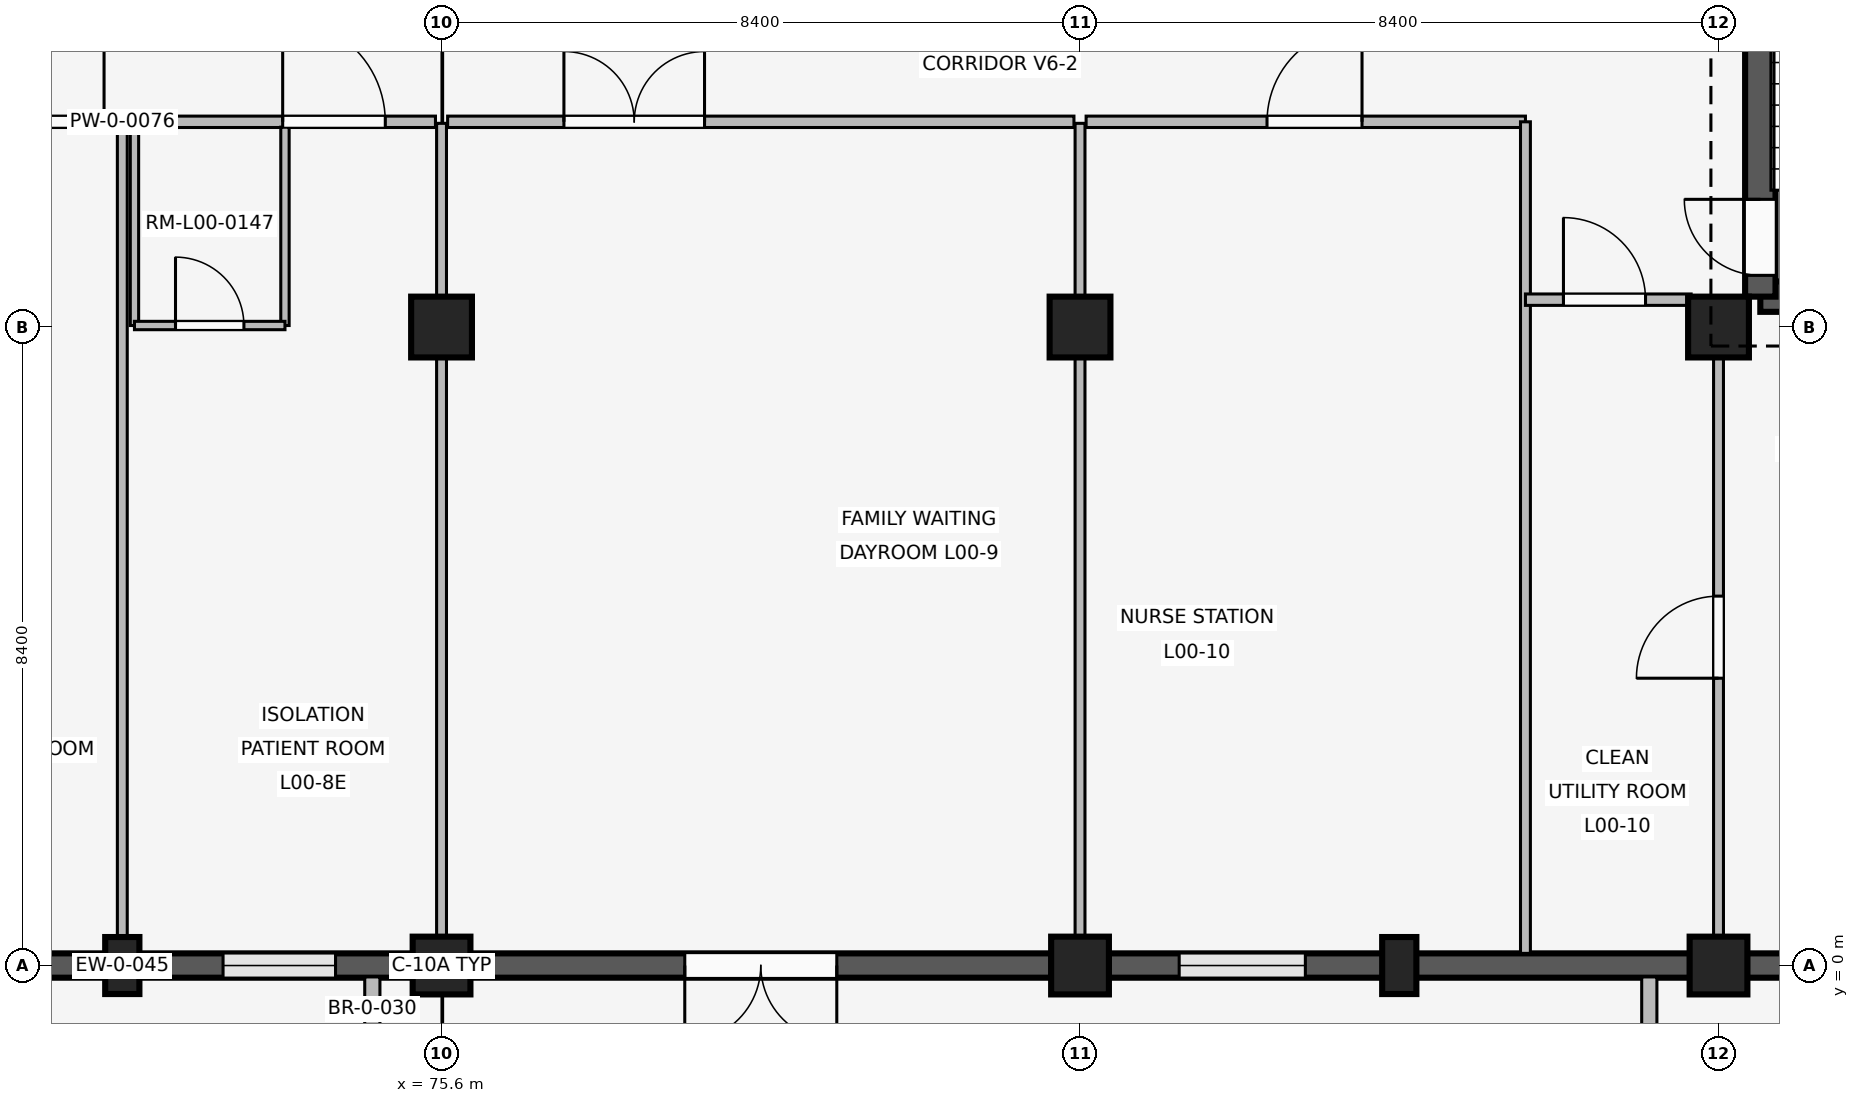
"""IFC4 building model, lengths in metres.
Left out: names, types, materials, properties, quantities, classifications, styles, units other than length and angle.
Written with IfcOpenShell. Run it as: python <this file> out.ifc"""

import sys

from ifc_helpers import new_model, si_unit, direction, frame, frame_2d, origin, origin_2d, place, context, subcontext, project, spatial, rectangle, extrude, element, fill, save


model = new_model("IFC4")
c1 = context("Model", 3, precision=1e-05, world=origin(), true_north=direction((0.0, 1.0)))
c2 = subcontext(c1, "Body", "Model", "MODEL_VIEW")
j1 = project(units=[si_unit("LENGTHUNIT", "METRE"), si_unit("PLANEANGLEUNIT", "RADIAN")], contexts=[c1])
p1 = place(None, origin())
s1 = spatial("IfcSite", under=j1, at=p1, CompositionType="ELEMENT")
p2 = place(p1, origin())
s2 = spatial("IfcBuilding", under=s1, at=p2, CompositionType="ELEMENT")
p3 = place(p2, origin())
s3 = spatial("IfcBuildingStorey", under=s2, at=p3, CompositionType="ELEMENT", Elevation=0.0)
p4 = place(p3, frame((75.6, 0.0, 0.0), z_axis=(0.0, 0.0, 1.0), x_axis=(1.0, 0.0, 0.0)))
e1 = element("IfcColumn", 1, at=p4, inside=s3, PredefinedType="COLUMN", context=c2, shape_type="SweptSolid", body=[
    extrude(rectangle(XDim=0.76, YDim=0.76, at=origin_2d()), origin(), (0.0, 0.0, 1.0), 4.8),
])
p5 = place(p3, frame((75.6, 8.4, 0.0), z_axis=(0.0, 0.0, 1.0), x_axis=(1.0, 0.0, 0.0)))
e2 = element("IfcColumn", 2, at=p5, inside=s3, PredefinedType="COLUMN", context=c2, shape_type="SweptSolid", body=[
    extrude(rectangle(XDim=0.8, YDim=0.8, at=origin_2d()), origin(), (0.0, 0.0, 1.0), 4.8),
])
p6 = place(p3, frame((84.0, 0.0, 0.0), z_axis=(0.0, 0.0, 1.0), x_axis=(1.0, 0.0, 0.0)))
e3 = element("IfcColumn", 3, at=p6, inside=s3, PredefinedType="COLUMN", context=c2, shape_type="SweptSolid", body=[
    extrude(rectangle(XDim=0.76, YDim=0.76, at=origin_2d()), origin(), (0.0, 0.0, 1.0), 4.8),
])
p7 = place(p3, frame((84.0, 8.4, 0.0), z_axis=(0.0, 0.0, 1.0), x_axis=(1.0, 0.0, 0.0)))
e4 = element("IfcColumn", 4, at=p7, inside=s3, PredefinedType="COLUMN", context=c2, shape_type="SweptSolid", body=[
    extrude(rectangle(XDim=0.8, YDim=0.8, at=origin_2d()), origin(), (0.0, 0.0, 1.0), 4.8),
])
p8 = place(p3, frame((92.4, 0.0, 0.0), z_axis=(0.0, 0.0, 1.0), x_axis=(1.0, 0.0, 0.0)))
e5 = element("IfcColumn", 5, at=p8, inside=s3, PredefinedType="COLUMN", context=c2, shape_type="SweptSolid", body=[
    extrude(rectangle(XDim=0.76, YDim=0.76, at=origin_2d()), origin(), (0.0, 0.0, 1.0), 4.8),
])
p9 = place(p3, frame((92.4, 8.4, 0.0), z_axis=(0.0, 0.0, 1.0), x_axis=(1.0, 0.0, 0.0)))
e6 = element("IfcColumn", 6, at=p9, inside=s3, PredefinedType="COLUMN", context=c2, shape_type="SweptSolid", body=[
    extrude(rectangle(XDim=0.8, YDim=0.8, at=origin_2d()), origin(), (0.0, 0.0, 1.0), 4.8),
])
for number, where, z_axis, x_axis in (
    (7, (71.4, 0.0, 0.0), (0.0, 0.0, 1.0), (1.0, 0.0, 0.0)),
    (8, (88.2, 0.0, 0.0), (0.0, 0.0, 1.0), (1.0, 0.0, 0.0)),
):
    element("IfcColumn", number, at=place(p3, frame(where, z_axis=z_axis, x_axis=x_axis)), inside=s3, PredefinedType="PILASTER", context=c2, shape_type="SweptSolid", body=[
        extrude(rectangle(XDim=0.45, YDim=0.75, at=origin_2d()), origin(), (0.0, 0.0, 1.0), 4.8),
    ])
p10 = place(p3, frame((75.225, 0.0, 0.0), z_axis=(0.0, 0.0, 1.0), x_axis=(-1.0, 0.0, 0.0)))
e9 = element("IfcWall", 9, at=p10, inside=s3, PredefinedType="SOLIDWALL", context=c2, shape_type="SweptSolid", body=[
    extrude(rectangle(XDim=7.65, YDim=0.32, at=frame_2d((3.825, 0.0))), origin(), (0.0, 0.0, 1.0), 3.82),
])
p11 = place(p10, frame((1.02, 0.0, 0.85)))
e10 = element("IfcOpeningElement", 10, at=p11, cuts=e9, PredefinedType="OPENING", context=c2, shape_type="SweptSolid", body=[
    extrude(rectangle(XDim=1.48, YDim=1.6, at=frame_2d((0.74, 0.8))), frame((0.0, 0.17, 0.0), z_axis=(0.0, -1.0, 0.0), x_axis=(1.0, 0.0, 0.0)), (0.0, 0.0, 1.0), 0.34),
])
p12 = place(p10, frame((5.15, 0.0, 0.85)))
e11 = element("IfcOpeningElement", 11, at=p12, cuts=e9, PredefinedType="OPENING", context=c2, shape_type="SweptSolid", body=[
    extrude(rectangle(XDim=1.48, YDim=1.6, at=frame_2d((0.74, 0.8))), frame((0.0, 0.17, 0.0), z_axis=(0.0, -1.0, 0.0), x_axis=(1.0, 0.0, 0.0)), (0.0, 0.0, 1.0), 0.34),
])
p13 = place(p3, frame((74.689, -0.15, 0.0), z_axis=(0.0, 0.0, 1.0), x_axis=(0.0, -1.0, 0.0)))
e12 = element("IfcWall", 12, at=p13, inside=s3, PredefinedType="ELEMENTEDWALL", context=c2, shape_type="SweptSolid", body=[
    extrude(rectangle(XDim=0.85, YDim=0.2, at=frame_2d((0.425, 0.0))), origin(), (0.0, 0.0, 1.0), 3.8),
])
p14 = place(p3, frame((83.625, 0.0, 0.0), z_axis=(0.0, 0.0, 1.0), x_axis=(-1.0, 0.0, 0.0)))
e13 = element("IfcWall", 13, at=p14, inside=s3, PredefinedType="SOLIDWALL", context=c2, shape_type="SweptSolid", body=[
    extrude(rectangle(XDim=7.65, YDim=0.32, at=frame_2d((3.825, 0.0))), origin(), (0.0, 0.0, 1.0), 3.82),
])
p15 = place(p14, frame((2.825, 0.0, 0.0)))
e14 = element("IfcOpeningElement", 14, at=p15, cuts=e13, PredefinedType="OPENING", context=c2, shape_type="SweptSolid", body=[
    extrude(rectangle(XDim=2.0, YDim=2.4, at=frame_2d((1.0, 1.2))), frame((0.0, 0.17, 0.0), z_axis=(0.0, -1.0, 0.0), x_axis=(1.0, 0.0, 0.0)), (0.0, 0.0, 1.0), 0.34),
])
p16 = place(p3, frame((92.025, 0.0, 0.0), z_axis=(0.0, 0.0, 1.0), x_axis=(-1.0, 0.0, 0.0)))
e15 = element("IfcWall", 15, at=p16, inside=s3, PredefinedType="SOLIDWALL", context=c2, shape_type="SweptSolid", body=[
    extrude(rectangle(XDim=7.65, YDim=0.32, at=frame_2d((3.825, 0.0))), origin(), (0.0, 0.0, 1.0), 3.82),
])
p17 = place(p16, frame((5.061, 0.0, 0.85)))
e16 = element("IfcOpeningElement", 16, at=p17, cuts=e15, PredefinedType="OPENING", context=c2, shape_type="SweptSolid", body=[
    extrude(rectangle(XDim=1.66, YDim=1.95, at=frame_2d((0.83, 0.975))), frame((0.0, 0.17, 0.0), z_axis=(0.0, -1.0, 0.0), x_axis=(1.0, 0.0, 0.0)), (0.0, 0.0, 1.0), 0.34),
])
p18 = place(p3, frame((91.49, -0.15, 0.0), z_axis=(0.0, 0.0, 1.0), x_axis=(0.0, -1.0, 0.0)))
e17 = element("IfcWall", 17, at=p18, inside=s3, PredefinedType="ELEMENTEDWALL", context=c2, shape_type="SweptSolid", body=[
    extrude(rectangle(XDim=0.85, YDim=0.2, at=frame_2d((0.425, 0.0))), origin(), (0.0, 0.0, 1.0), 3.8),
])
p19 = place(p3, frame((100.425, 0.0, 0.0), z_axis=(0.0, 0.0, 1.0), x_axis=(-1.0, 0.0, 0.0)))
e18 = element("IfcWall", 18, at=p19, inside=s3, PredefinedType="SOLIDWALL", context=c2, shape_type="SweptSolid", body=[
    extrude(rectangle(XDim=7.65, YDim=0.32, at=frame_2d((3.825, 0.0))), origin(), (0.0, 0.0, 1.0), 3.82),
])
p20 = place(p19, frame((5.375, 0.0, 0.0)))
e19 = element("IfcOpeningElement", 19, at=p20, cuts=e18, PredefinedType="OPENING", context=c2, shape_type="SweptSolid", body=[
    extrude(rectangle(XDim=1.2, YDim=2.25, at=frame_2d((0.6, 1.125))), frame((0.0, 0.17, 0.0), z_axis=(0.0, -1.0, 0.0), x_axis=(1.0, 0.0, 0.0)), (0.0, 0.0, 1.0), 0.34),
])
p21 = place(p19, frame((0.8, 0.0, 0.85)))
e20 = element("IfcOpeningElement", 20, at=p21, cuts=e18, PredefinedType="OPENING", context=c2, shape_type="SweptSolid", body=[
    extrude(rectangle(XDim=1.54, YDim=1.85, at=frame_2d((0.77, 0.925))), frame((0.0, 0.17, 0.0), z_axis=(0.0, -1.0, 0.0), x_axis=(1.0, 0.0, 0.0)), (0.0, 0.0, 1.0), 0.34),
])
p22 = place(p19, frame((2.9, 0.0, 0.85)))
e21 = element("IfcOpeningElement", 21, at=p22, cuts=e18, PredefinedType="OPENING", context=c2, shape_type="SweptSolid", body=[
    extrude(rectangle(XDim=1.54, YDim=1.85, at=frame_2d((0.77, 0.925))), frame((0.0, 0.17, 0.0), z_axis=(0.0, -1.0, 0.0), x_axis=(1.0, 0.0, 0.0)), (0.0, 0.0, 1.0), 0.34),
])
p23 = place(p3, frame((92.95, 8.8, 0.0), z_axis=(0.0, 0.0, 1.0), x_axis=(1.0, 0.0, 0.0)))
e22 = element("IfcWall", 22, at=p23, inside=s3, PredefinedType="SHEAR", context=c2, shape_type="SweptSolid", body=[
    extrude(rectangle(XDim=7.5, YDim=0.4, at=frame_2d((3.75, 0.0))), origin(), (0.0, 0.0, 1.0), 4.52),
])
p24 = place(p23, frame((4.85, 0.0, 0.0)))
e23 = element("IfcOpeningElement", 23, at=p24, cuts=e22, PredefinedType="OPENING", context=c2, shape_type="SweptSolid", body=[
    extrude(rectangle(XDim=1.2, YDim=2.2, at=frame_2d((0.6, 1.1))), frame((0.0, 0.21, 0.0), z_axis=(0.0, -1.0, 0.0), x_axis=(1.0, 0.0, 0.0)), (0.0, 0.0, 1.0), 0.42),
])
p25 = place(p23, frame((0.9, 0.0, 0.0)))
e24 = element("IfcOpeningElement", 24, at=p25, cuts=e22, PredefinedType="OPENING", context=c2, shape_type="SweptSolid", body=[
    extrude(rectangle(XDim=1.2, YDim=2.2, at=frame_2d((0.6, 1.1))), frame((0.0, 0.21, 0.0), z_axis=(0.0, -1.0, 0.0), x_axis=(1.0, 0.0, 0.0)), (0.0, 0.0, 1.0), 0.42),
])
p26 = place(p3, frame((92.95, 8.8, 0.0), z_axis=(0.0, 0.0, 1.0), x_axis=(0.0, 1.0, 0.0)))
e25 = element("IfcWall", 25, at=p26, inside=s3, PredefinedType="SHEAR", context=c2, shape_type="SweptSolid", body=[
    extrude(rectangle(XDim=7.55, YDim=0.4, at=frame_2d((3.775, 0.0))), origin(), (0.0, 0.0, 1.0), 4.52),
])
p27 = place(p26, frame((0.28, 0.0, 0.0)))
e26 = element("IfcOpeningElement", 26, at=p27, cuts=e25, PredefinedType="OPENING", context=c2, shape_type="SweptSolid", body=[
    extrude(rectangle(XDim=1.0, YDim=2.15, at=frame_2d((0.5, 1.075))), frame((0.0, 0.21, 0.0), z_axis=(0.0, -1.0, 0.0), x_axis=(1.0, 0.0, 0.0)), (0.0, 0.0, 1.0), 0.42),
])
p28 = place(p3, frame((67.28, 11.1, 0.0), z_axis=(0.0, 0.0, 1.0), x_axis=(1.0, 0.0, 0.0)))
e27 = element("IfcWall", 27, at=p28, inside=s3, PredefinedType="PARTITIONING", context=c2, shape_type="SweptSolid", body=[
    extrude(rectangle(XDim=8.24, YDim=0.15, at=frame_2d((4.12, 0.0))), origin(), (0.0, 0.0, 1.0), 3.8),
])
p29 = place(p28, frame((2.53, 0.0, 0.0)))
e28 = element("IfcOpeningElement", 28, at=p29, cuts=e27, PredefinedType="OPENING", context=c2, shape_type="SweptSolid", body=[
    extrude(rectangle(XDim=1.35, YDim=2.25, at=frame_2d((0.675, 1.125))), frame((0.0, 0.085, 0.0), z_axis=(0.0, -1.0, 0.0), x_axis=(1.0, 0.0, 0.0)), (0.0, 0.0, 1.0), 0.17),
])
p30 = place(p28, frame((6.23, 0.0, 0.0)))
e29 = element("IfcOpeningElement", 29, at=p30, cuts=e27, PredefinedType="OPENING", context=c2, shape_type="SweptSolid", body=[
    extrude(rectangle(XDim=1.35, YDim=2.25, at=frame_2d((0.675, 1.125))), frame((0.0, 0.085, 0.0), z_axis=(0.0, -1.0, 0.0), x_axis=(1.0, 0.0, 0.0)), (0.0, 0.0, 1.0), 0.17),
])
p31 = place(p3, frame((71.4, 0.1, 0.0), z_axis=(0.0, 0.0, 1.0), x_axis=(0.0, 1.0, 0.0)))
e30 = element("IfcWall", 30, at=p31, inside=s3, PredefinedType="PARTITIONING", context=c2, shape_type="SweptSolid", body=[
    extrude(rectangle(XDim=10.93, YDim=0.13, at=frame_2d((5.465, 0.0))), origin(), (0.0, 0.0, 1.0), 3.8),
])
for number, where, z_axis, x_axis in (
    (31, (71.56, 8.42, 0.0), (0.0, 0.0, 1.0), (0.0, 1.0, 0.0)),
    (32, (73.54, 8.42, 0.0), (0.0, 0.0, 1.0), (0.0, 1.0, 0.0)),
):
    element("IfcWall", number, at=place(p3, frame(where, z_axis=z_axis, x_axis=x_axis)), inside=s3, PredefinedType="PARTITIONING", context=c2, shape_type="SweptSolid", body=[
        extrude(rectangle(XDim=2.61, YDim=0.11, at=frame_2d((1.305, 0.0))), origin(), (0.0, 0.0, 1.0), 3.8),
    ])
p32 = place(p3, frame((71.56, 8.42, 0.0), z_axis=(0.0, 0.0, 1.0), x_axis=(1.0, 0.0, 0.0)))
e33 = element("IfcWall", 33, at=p32, inside=s3, PredefinedType="PARTITIONING", context=c2, shape_type="SweptSolid", body=[
    extrude(rectangle(XDim=1.98, YDim=0.11, at=frame_2d((0.99, 0.0))), origin(), (0.0, 0.0, 1.0), 3.8),
])
p33 = place(p32, frame((0.54, 0.0, 0.0)))
e34 = element("IfcOpeningElement", 34, at=p33, cuts=e33, PredefinedType="OPENING", context=c2, shape_type="SweptSolid", body=[
    extrude(rectangle(XDim=0.9, YDim=2.1, at=frame_2d((0.45, 1.05))), frame((0.0, 0.065, 0.0), z_axis=(0.0, -1.0, 0.0), x_axis=(1.0, 0.0, 0.0)), (0.0, 0.0, 1.0), 0.13),
])
p34 = place(p3, frame((75.6, 0.14, 0.0), z_axis=(0.0, 0.0, 1.0), x_axis=(0.0, 1.0, 0.0)))
e35 = element("IfcWall", 35, at=p34, inside=s3, PredefinedType="PARTITIONING", context=c2, shape_type="SweptSolid", body=[
    extrude(rectangle(XDim=10.94, YDim=0.13, at=frame_2d((5.47, 0.0))), origin(), (0.0, 0.0, 1.0), 3.8),
])
p35 = place(p3, frame((75.68, 11.1, 0.0), z_axis=(0.0, 0.0, 1.0), x_axis=(1.0, 0.0, 0.0)))
e36 = element("IfcWall", 36, at=p35, inside=s3, PredefinedType="PARTITIONING", context=c2, shape_type="SweptSolid", body=[
    extrude(rectangle(XDim=8.24, YDim=0.15, at=frame_2d((4.12, 0.0))), origin(), (0.0, 0.0, 1.0), 3.8),
])
p36 = place(p35, frame((1.53, 0.0, 0.0)))
e37 = element("IfcOpeningElement", 37, at=p36, cuts=e36, PredefinedType="OPENING", context=c2, shape_type="SweptSolid", body=[
    extrude(rectangle(XDim=1.85, YDim=2.3, at=frame_2d((0.925, 1.15))), frame((0.0, 0.085, 0.0), z_axis=(0.0, -1.0, 0.0), x_axis=(1.0, 0.0, 0.0)), (0.0, 0.0, 1.0), 0.17),
])
p37 = place(p3, frame((84.0, 0.14, 0.0), z_axis=(0.0, 0.0, 1.0), x_axis=(0.0, 1.0, 0.0)))
e38 = element("IfcWall", 38, at=p37, inside=s3, PredefinedType="PARTITIONING", context=c2, shape_type="SweptSolid", body=[
    extrude(rectangle(XDim=10.94, YDim=0.13, at=frame_2d((5.47, 0.0))), origin(), (0.0, 0.0, 1.0), 3.8),
])
p38 = place(p3, frame((84.08, 11.1, 0.0), z_axis=(0.0, 0.0, 1.0), x_axis=(1.0, 0.0, 0.0)))
e39 = element("IfcWall", 39, at=p38, inside=s3, PredefinedType="PARTITIONING", context=c2, shape_type="SweptSolid", body=[
    extrude(rectangle(XDim=5.78, YDim=0.15, at=frame_2d((2.89, 0.0))), origin(), (0.0, 0.0, 1.0), 3.8),
])
p39 = place(p38, frame((2.38, 0.0, 0.0)))
e40 = element("IfcOpeningElement", 40, at=p39, cuts=e39, PredefinedType="OPENING", context=c2, shape_type="SweptSolid", body=[
    extrude(rectangle(XDim=1.25, YDim=2.2, at=frame_2d((0.625, 1.1))), frame((0.0, 0.085, 0.0), z_axis=(0.0, -1.0, 0.0), x_axis=(1.0, 0.0, 0.0)), (0.0, 0.0, 1.0), 0.17),
])
p40 = place(p3, frame((89.86, 0.16, 0.0), z_axis=(0.0, 0.0, 1.0), x_axis=(0.0, 1.0, 0.0)))
e41 = element("IfcWall", 41, at=p40, inside=s3, PredefinedType="PARTITIONING", context=c2, shape_type="SweptSolid", body=[
    extrude(rectangle(XDim=10.94, YDim=0.13, at=frame_2d((5.47, 0.0))), origin(), (0.0, 0.0, 1.0), 3.8),
])
p41 = place(p3, frame((89.86, 8.76, 0.0), z_axis=(0.0, 0.0, 1.0), x_axis=(1.0, 0.0, 0.0)))
e42 = element("IfcWall", 42, at=p41, inside=s3, PredefinedType="PARTITIONING", context=c2, shape_type="SweptSolid", body=[
    extrude(rectangle(XDim=2.18, YDim=0.15, at=frame_2d((1.09, 0.0))), origin(), (0.0, 0.0, 1.0), 3.8),
])
p42 = place(p41, frame((0.5, 0.0, 0.0)))
e43 = element("IfcOpeningElement", 43, at=p42, cuts=e42, PredefinedType="OPENING", context=c2, shape_type="SweptSolid", body=[
    extrude(rectangle(XDim=1.08, YDim=2.15, at=frame_2d((0.54, 1.075))), frame((0.0, 0.085, 0.0), z_axis=(0.0, -1.0, 0.0), x_axis=(1.0, 0.0, 0.0)), (0.0, 0.0, 1.0), 0.17),
])
p43 = place(p3, frame((92.4, 0.14, 0.0), z_axis=(0.0, 0.0, 1.0), x_axis=(0.0, 1.0, 0.0)))
e44 = element("IfcWall", 44, at=p43, inside=s3, PredefinedType="PARTITIONING", context=c2, shape_type="SweptSolid", body=[
    extrude(rectangle(XDim=8.21, YDim=0.13, at=frame_2d((4.105, 0.0))), origin(), (0.0, 0.0, 1.0), 3.8),
])
p44 = place(p43, frame((3.64, 0.0, 0.0)))
e45 = element("IfcOpeningElement", 45, at=p44, cuts=e44, PredefinedType="OPENING", context=c2, shape_type="SweptSolid", body=[
    extrude(rectangle(XDim=1.08, YDim=2.15, at=frame_2d((0.54, 1.075))), frame((0.0, 0.075, 0.0), z_axis=(0.0, -1.0, 0.0), x_axis=(1.0, 0.0, 0.0)), (0.0, 0.0, 1.0), 0.15),
])
p45 = place(p11, origin())
e46 = element("IfcWindow", 46, at=p45, inside=s3, PartitioningType="SINGLE_PANEL", PredefinedType="WINDOW", context=c2, shape_type="SweptSolid", body=[
    extrude(rectangle(XDim=1.48, YDim=1.6, at=frame_2d((0.74, 0.8))), frame((0.0, 0.03, 0.0), z_axis=(0.0, -1.0, 0.0), x_axis=(1.0, 0.0, 0.0)), (0.0, 0.0, 1.0), 0.06),
])
fill(e10, e46)
p46 = place(p15, origin())
e47 = element("IfcDoor", 47, at=p46, inside=s3, OperationType="DOUBLE_SWING_LEFT", PredefinedType="DOOR", context=c2, shape_type="SweptSolid", body=[
    extrude(rectangle(XDim=2.0, YDim=2.4, at=frame_2d((1.0, 1.2))), frame((0.0, 0.025, 0.0), z_axis=(0.0, -1.0, 0.0), x_axis=(1.0, 0.0, 0.0)), (0.0, 0.0, 1.0), 0.05),
])
fill(e14, e47)
p47 = place(p17, origin())
e48 = element("IfcWindow", 48, at=p47, inside=s3, PartitioningType="SINGLE_PANEL", PredefinedType="WINDOW", context=c2, shape_type="SweptSolid", body=[
    extrude(rectangle(XDim=1.66, YDim=1.95, at=frame_2d((0.83, 0.975))), frame((0.0, 0.03, 0.0), z_axis=(0.0, -1.0, 0.0), x_axis=(1.0, 0.0, 0.0)), (0.0, 0.0, 1.0), 0.06),
])
fill(e16, e48)
p48 = place(p27, origin())
e49 = element("IfcDoor", 49, at=p48, inside=s3, OperationType="SINGLE_SWING_RIGHT", PredefinedType="DOOR", context=c2, shape_type="SweptSolid", body=[
    extrude(rectangle(XDim=1.0, YDim=2.15, at=frame_2d((0.5, 1.075))), frame((0.0, 0.025, 0.0), z_axis=(0.0, -1.0, 0.0), x_axis=(1.0, 0.0, 0.0)), (0.0, 0.0, 1.0), 0.05),
])
fill(e26, e49)
p49 = place(p29, origin())
e50 = element("IfcDoor", 50, at=p49, inside=s3, OperationType="SINGLE_SWING_RIGHT", PredefinedType="DOOR", context=c2, shape_type="SweptSolid", body=[
    extrude(rectangle(XDim=1.35, YDim=2.25, at=frame_2d((0.675, 1.125))), frame((0.0, 0.025, 0.0), z_axis=(0.0, -1.0, 0.0), x_axis=(1.0, 0.0, 0.0)), (0.0, 0.0, 1.0), 0.05),
])
fill(e28, e50)
p50 = place(p30, origin())
e51 = element("IfcDoor", 51, at=p50, inside=s3, OperationType="SINGLE_SWING_LEFT", PredefinedType="DOOR", context=c2, shape_type="SweptSolid", body=[
    extrude(rectangle(XDim=1.35, YDim=2.25, at=frame_2d((0.675, 1.125))), frame((0.0, 0.025, 0.0), z_axis=(0.0, -1.0, 0.0), x_axis=(1.0, 0.0, 0.0)), (0.0, 0.0, 1.0), 0.05),
])
fill(e29, e51)
p51 = place(p33, origin())
e52 = element("IfcDoor", 52, at=p51, inside=s3, OperationType="SINGLE_SWING_LEFT", PredefinedType="DOOR", context=c2, shape_type="SweptSolid", body=[
    extrude(rectangle(XDim=0.9, YDim=2.1, at=frame_2d((0.45, 1.05))), frame((0.0, 0.025, 0.0), z_axis=(0.0, -1.0, 0.0), x_axis=(1.0, 0.0, 0.0)), (0.0, 0.0, 1.0), 0.05),
])
fill(e34, e52)
p52 = place(p36, origin())
e53 = element("IfcDoor", 53, at=p52, inside=s3, OperationType="DOUBLE_SWING_LEFT", PredefinedType="DOOR", context=c2, shape_type="SweptSolid", body=[
    extrude(rectangle(XDim=1.85, YDim=2.3, at=frame_2d((0.925, 1.15))), frame((0.0, 0.025, 0.0), z_axis=(0.0, -1.0, 0.0), x_axis=(1.0, 0.0, 0.0)), (0.0, 0.0, 1.0), 0.05),
])
fill(e37, e53)
p53 = place(p39, origin())
e54 = element("IfcDoor", 54, at=p53, inside=s3, OperationType="SINGLE_SWING_RIGHT", PredefinedType="DOOR", context=c2, shape_type="SweptSolid", body=[
    extrude(rectangle(XDim=1.25, YDim=2.2, at=frame_2d((0.625, 1.1))), frame((0.0, 0.025, 0.0), z_axis=(0.0, -1.0, 0.0), x_axis=(1.0, 0.0, 0.0)), (0.0, 0.0, 1.0), 0.05),
])
fill(e40, e54)
p54 = place(p42, origin())
e55 = element("IfcDoor", 55, at=p54, inside=s3, OperationType="SINGLE_SWING_LEFT", PredefinedType="DOOR", context=c2, shape_type="SweptSolid", body=[
    extrude(rectangle(XDim=1.08, YDim=2.15, at=frame_2d((0.54, 1.075))), frame((0.0, 0.025, 0.0), z_axis=(0.0, -1.0, 0.0), x_axis=(1.0, 0.0, 0.0)), (0.0, 0.0, 1.0), 0.05),
])
fill(e43, e55)
p55 = place(p44, origin())
e56 = element("IfcDoor", 56, at=p55, inside=s3, OperationType="SINGLE_SWING_LEFT", PredefinedType="DOOR", context=c2, shape_type="SweptSolid", body=[
    extrude(rectangle(XDim=1.08, YDim=2.15, at=frame_2d((0.54, 1.075))), frame((0.0, 0.025, 0.0), z_axis=(0.0, -1.0, 0.0), x_axis=(1.0, 0.0, 0.0)), (0.0, 0.0, 1.0), 0.05),
])
fill(e45, e56)
save(model, sys.argv[1])
